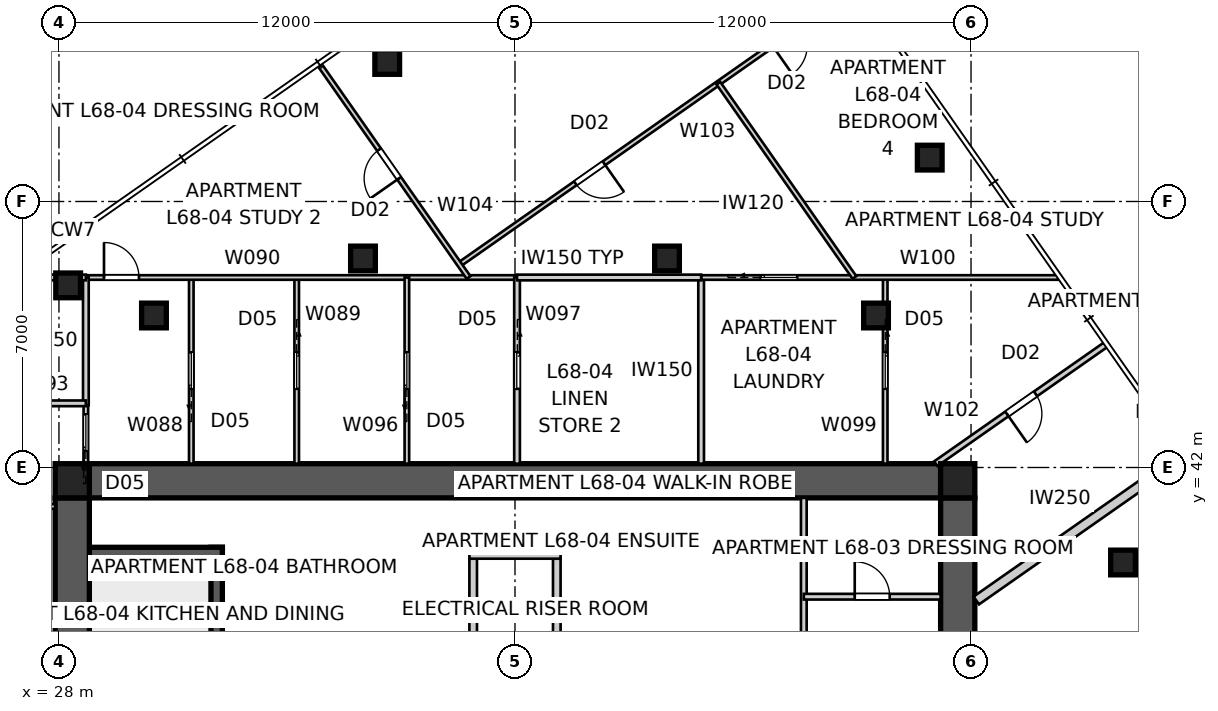
"""IFC4 building model, lengths in metres.
Left out: names, types, materials, properties, quantities, classifications, styles, units other than length and angle.
Written with IfcOpenShell. Run it as: python <this file> out.ifc"""

import sys

from ifc_helpers import new_model, si_unit, direction, frame, frame_2d, origin, origin_2d, place, context, subcontext, project, spatial, polyline, rectangle, outline, extrude, element, fill, save


model = new_model("IFC4")
c1 = context("Model", 3, precision=1e-05, world=origin(), true_north=direction((0.0, 1.0)))
c2 = subcontext(c1, "Body", "Model", "MODEL_VIEW")
j1 = project(units=[si_unit("LENGTHUNIT", "METRE"), si_unit("PLANEANGLEUNIT", "RADIAN")], contexts=[c1])
p1 = place(None, origin())
s1 = spatial("IfcSite", under=j1, at=p1, CompositionType="ELEMENT")
p2 = place(p1, origin())
s2 = spatial("IfcBuilding", under=s1, at=p2, CompositionType="ELEMENT")
p3 = place(p2, frame((0.0, 0.0, 247.2)))
s3 = spatial("IfcBuildingStorey", under=s2, at=p3, CompositionType="ELEMENT", Elevation=247.2)
p4 = place(p3, frame((28.8, 41.65, 0.0), z_axis=(0.0, 0.0, 1.0), x_axis=(1.0, 0.0, 0.0)))
e1 = element("IfcWall", 1, at=p4, inside=s3, PredefinedType="SHEAR", context=c2, shape_type="SweptSolid", body=[
    extrude(outline(polyline([(0.0, -0.45), (22.4, -0.45), (22.4, -0.025), (22.85, -0.025), (22.85, 0.025), (22.4, 0.025), (22.4, 0.45), (0.0, 0.45), (0.0, 0.025), (-0.45, 0.025), (-0.45, -0.025), (0.0, -0.025), (0.0, -0.45)])), origin(), (0.0, 0.0, 1.0), 3.4),
])
p5 = place(p3, frame((51.65, 18.8, 0.0), z_axis=(0.0, 0.0, 1.0), x_axis=(0.0, 1.0, 0.0)))
e2 = element("IfcWall", 2, at=p5, inside=s3, PredefinedType="SHEAR", context=c2, shape_type="SweptSolid", body=[
    extrude(outline(polyline([(0.0, -0.45), (22.4, -0.45), (22.4, -0.025), (22.85, -0.025), (22.85, 0.025), (22.4, 0.025), (22.4, 0.45), (0.0, 0.45), (0.0, 0.025), (-0.45, 0.025), (-0.45, -0.025), (0.0, -0.025), (0.0, -0.45)])), origin(), (0.0, 0.0, 1.0), 3.4),
])
p6 = place(p5, frame((11.14, 0.0, 0.0)))
e3 = element("IfcOpeningElement", 3, at=p6, cuts=e2, PredefinedType="OPENING", context=c2, shape_type="SweptSolid", body=[
    extrude(rectangle(XDim=1.02, YDim=2.4, at=frame_2d((0.51, 1.2))), frame((0.0, 0.46, 0.0), z_axis=(0.0, -1.0, 0.0), x_axis=(1.0, 0.0, 0.0)), (0.0, 0.0, 1.0), 0.92),
])
p7 = place(p3, frame((28.35, 41.2, 0.0), z_axis=(0.0, 0.0, 1.0), x_axis=(0.0, -1.0, 0.0)))
e4 = element("IfcWall", 4, at=p7, inside=s3, PredefinedType="SHEAR", context=c2, shape_type="SweptSolid", body=[
    extrude(outline(polyline([(0.0, -0.45), (22.4, -0.45), (22.4, -0.025), (22.85, -0.025), (22.85, 0.025), (22.4, 0.025), (22.4, 0.45), (0.0, 0.45), (0.0, 0.025), (-0.45, 0.025), (-0.45, -0.025), (0.0, -0.025), (0.0, -0.45)])), origin(), (0.0, 0.0, 1.0), 3.4),
])
p8 = place(p7, frame((11.14, 0.0, 0.0)))
e5 = element("IfcOpeningElement", 5, at=p8, cuts=e4, PredefinedType="OPENING", context=c2, shape_type="SweptSolid", body=[
    extrude(rectangle(XDim=1.02, YDim=2.4, at=frame_2d((0.51, 1.2))), frame((0.0, 0.46, 0.0), z_axis=(0.0, -1.0, 0.0), x_axis=(1.0, 0.0, 0.0)), (0.0, 0.0, 1.0), 0.92),
])
p9 = place(p3, frame((32.15, 32.2, 0.0), z_axis=(0.0, 0.0, 1.0), x_axis=(0.0, 1.0, 0.0)))
e6 = element("IfcWall", 6, at=p9, inside=s3, PredefinedType="SHEAR", context=c2, shape_type="SweptSolid", body=[
    extrude(rectangle(XDim=7.7, YDim=0.3, at=frame_2d((3.85, 0.0))), origin(), (0.0, 0.0, 1.0), 3.4),
])
p10 = place(p3, frame((28.8, 39.75, 0.0), z_axis=(0.0, 0.0, 1.0), x_axis=(1.0, 0.0, 0.0)))
e7 = element("IfcWall", 7, at=p10, inside=s3, PredefinedType="SHEAR", context=c2, shape_type="SweptSolid", body=[
    extrude(rectangle(XDim=3.5, YDim=0.3, at=frame_2d((1.75, 0.0))), origin(), (0.0, 0.0, 1.0), 3.4),
])
for number, where, z_axis, x_axis in (
    (8, (38.9, 37.6, 0.0), (0.0, 0.0, 1.0), (0.0, 1.0, 0.0)),
    (9, (41.1, 37.6, 0.0), (0.0, 0.0, 1.0), (0.0, 1.0, 0.0)),
):
    element("IfcWall", number, at=place(p3, frame(where, z_axis=z_axis, x_axis=x_axis)), inside=s3, PredefinedType="SOLIDWALL", context=c2, shape_type="SweptSolid", body=[
        extrude(rectangle(XDim=2.0, YDim=0.2, at=frame_2d((1.0, 0.0))), origin(), (0.0, 0.0, 1.0), 3.4),
    ])
p11 = place(p3, frame((38.8, 39.7, 0.0), z_axis=(0.0, 0.0, 1.0), x_axis=(1.0, 0.0, 0.0)))
e10 = element("IfcWall", 10, at=p11, inside=s3, PredefinedType="SOLIDWALL", context=c2, shape_type="SweptSolid", body=[
    extrude(rectangle(XDim=2.4, YDim=0.2, at=frame_2d((1.2, 0.0))), origin(), (0.0, 0.0, 1.0), 3.4),
])
for number, where, z_axis, x_axis in (
    (11, (51.65, 41.65, 0.0), (0.0, 0.0, 1.0), (1.0, 0.0, 0.0)),
    (12, (28.35, 41.65, 0.0), (0.0, 0.0, 1.0), (1.0, 0.0, 0.0)),
):
    element("IfcColumn", number, at=place(p3, frame(where, z_axis=z_axis, x_axis=x_axis)), inside=s3, PredefinedType="COLUMN", context=c2, shape_type="SweptSolid", body=[
        extrude(rectangle(XDim=0.9, YDim=0.9, at=origin_2d()), origin(), (0.0, 0.0, 1.0), 3.4),
    ])
for number, where, z_axis, x_axis in (
    (13, (50.914, 50.155, 0.0), (0.0, 0.0, 1.0), (1.0, 0.0, 0.0)),
    (14, (36.638, 52.672, 0.0), (0.0, 0.0, 1.0), (1.0, 0.0, 0.0)),
    (15, (28.242, 46.793, 0.0), (0.0, 0.0, 1.0), (1.0, 0.0, 0.0)),
    (16, (56.0, 39.5, 0.0), (0.0, 0.0, 1.0), (1.0, 0.0, 0.0)),
    (17, (49.5, 46.0, 0.0), (0.0, 0.0, 1.0), (1.0, 0.0, 0.0)),
    (18, (44.0, 47.5, 0.0), (0.0, 0.0, 1.0), (1.0, 0.0, 0.0)),
    (19, (36.0, 47.5, 0.0), (0.0, 0.0, 1.0), (1.0, 0.0, 0.0)),
    (20, (30.5, 46.0, 0.0), (0.0, 0.0, 1.0), (1.0, 0.0, 0.0)),
):
    element("IfcColumn", number, at=place(p3, frame(where, z_axis=z_axis, x_axis=x_axis)), inside=s3, PredefinedType="COLUMN", context=c2, shape_type="SweptSolid", body=[
        extrude(rectangle(XDim=0.65, YDim=0.65, at=origin_2d()), origin(), (0.0, 0.0, 1.0), 3.4),
    ])
p12 = place(p3, frame((57.612, 42.332, 0.0), z_axis=(0.0, 0.0, 1.0), x_axis=(-0.819161528122, -0.573562891796, 0.0)))
e21 = element("IfcWall", 21, at=p12, inside=s3, PredefinedType="PARTITIONING", context=c2, shape_type="SweptSolid", body=[
    extrude(rectangle(XDim=6.681, YDim=0.25, at=frame_2d((3.341, 0.0))), origin(), (0.0, 0.0, 1.0), 3.25),
])
p13 = place(p3, frame((47.6, 41.2, 0.0), z_axis=(0.0, 0.0, 1.0), x_axis=(0.0, -1.0, 0.0)))
e22 = element("IfcWall", 22, at=p13, inside=s3, PredefinedType="SOLIDWALL", context=c2, shape_type="SweptSolid", body=[
    extrude(rectangle(XDim=5.9, YDim=0.15, at=frame_2d((2.95, 0.0))), origin(), (0.0, 0.0, 1.0), 3.25),
])
p14 = place(p3, frame((47.6, 38.6, 0.0), z_axis=(0.0, 0.0, 1.0), x_axis=(1.0, 0.0, 0.0)))
e23 = element("IfcWall", 23, at=p14, inside=s3, PredefinedType="SOLIDWALL", context=c2, shape_type="SweptSolid", body=[
    extrude(rectangle(XDim=3.6, YDim=0.15, at=frame_2d((1.8, 0.0))), origin(), (0.0, 0.0, 1.0), 3.25),
])
p15 = place(p14, frame((1.34, 0.0, 0.0)))
e24 = element("IfcOpeningElement", 24, at=p15, cuts=e23, PredefinedType="OPENING", context=c2, shape_type="SweptSolid", body=[
    extrude(rectangle(XDim=0.92, YDim=2.1, at=frame_2d((0.46, 1.05))), frame((0.0, 0.085, 0.0), z_axis=(0.0, -1.0, 0.0), x_axis=(1.0, 0.0, 0.0)), (0.0, 0.0, 1.0), 0.17),
])
p16 = place(p3, frame((23.0, 40.974, 0.0), z_axis=(0.0, 0.0, 1.0), x_axis=(1.0, 0.0, 0.0)))
e25 = element("IfcWall", 25, at=p16, inside=s3, PredefinedType="PARTITIONING", context=c2, shape_type="SweptSolid", body=[
    extrude(rectangle(XDim=4.9, YDim=0.12, at=frame_2d((2.45, 0.0))), origin(), (0.0, 0.0, 1.0), 3.25),
])
p17 = place(p16, frame((1.97, 0.0, 0.0)))
e26 = element("IfcOpeningElement", 26, at=p17, cuts=e25, PredefinedType="OPENING", context=c2, shape_type="SweptSolid", body=[
    extrude(rectangle(XDim=0.96, YDim=2.1, at=frame_2d((0.48, 1.05))), frame((0.0, 0.07, 0.0), z_axis=(0.0, -1.0, 0.0), x_axis=(1.0, 0.0, 0.0)), (0.0, 0.0, 1.0), 0.14),
])
p18 = place(p3, frame((31.482, 42.1, 0.0), z_axis=(0.0, 0.0, 1.0), x_axis=(0.0, 1.0, 0.0)))
e27 = element("IfcWall", 27, at=p18, inside=s3, PredefinedType="PARTITIONING", context=c2, shape_type="SweptSolid", body=[
    extrude(rectangle(XDim=4.9, YDim=0.12, at=frame_2d((2.45, 0.0))), origin(), (0.0, 0.0, 1.0), 3.25),
])
p19 = place(p18, frame((1.97, 0.0, 0.0)))
e28 = element("IfcOpeningElement", 28, at=p19, cuts=e27, PredefinedType="OPENING", context=c2, shape_type="SweptSolid", body=[
    extrude(rectangle(XDim=0.96, YDim=2.1, at=frame_2d((0.48, 1.05))), frame((0.0, 0.07, 0.0), z_axis=(0.0, -1.0, 0.0), x_axis=(1.0, 0.0, 0.0)), (0.0, 0.0, 1.0), 0.14),
])
p20 = place(p3, frame((34.256, 47.0, 0.0), z_axis=(0.0, 0.0, 1.0), x_axis=(0.0, -1.0, 0.0)))
e29 = element("IfcWall", 29, at=p20, inside=s3, PredefinedType="PARTITIONING", context=c2, shape_type="SweptSolid", body=[
    extrude(rectangle(XDim=4.9, YDim=0.12, at=frame_2d((2.45, 0.0))), origin(), (0.0, 0.0, 1.0), 2.796),
])
p21 = place(p20, frame((1.97, 0.0, 0.0)))
e30 = element("IfcOpeningElement", 30, at=p21, cuts=e29, PredefinedType="OPENING", context=c2, shape_type="SweptSolid", body=[
    extrude(rectangle(XDim=0.96, YDim=2.1, at=frame_2d((0.48, 1.05))), frame((0.0, 0.07, 0.0), z_axis=(0.0, -1.0, 0.0), x_axis=(1.0, 0.0, 0.0)), (0.0, 0.0, 1.0), 0.14),
])
p22 = place(p3, frame((28.708, 47.0, 0.0), z_axis=(0.0, 0.0, 1.0), x_axis=(1.0, 0.0, 0.0)))
e31 = element("IfcWall", 31, at=p22, inside=s3, PredefinedType="PARTITIONING", context=c2, shape_type="SweptSolid", body=[
    extrude(rectangle(XDim=11.346, YDim=0.12, at=frame_2d((5.673, 0.0))), origin(), (0.0, 0.0, 1.0), 2.55),
])
p23 = place(p22, frame((0.477, 0.0, 0.0)))
e32 = element("IfcOpeningElement", 32, at=p23, cuts=e31, PredefinedType="OPENING", context=c2, shape_type="SweptSolid", body=[
    extrude(rectangle(XDim=0.92, YDim=2.34, at=frame_2d((0.46, 1.17))), frame((0.0, 0.07, 0.0), z_axis=(0.0, -1.0, 0.0), x_axis=(1.0, 0.0, 0.0)), (0.0, 0.0, 1.0), 0.14),
])
p24 = place(p3, frame((28.708, 41.18, 0.0), z_axis=(0.0, 0.0, 1.0), x_axis=(0.0, 1.0, 0.0)))
e33 = element("IfcWall", 33, at=p24, inside=s3, PredefinedType="PARTITIONING", context=c2, shape_type="SweptSolid", body=[
    extrude(rectangle(XDim=2.458, YDim=0.12, at=frame_2d((1.229, 0.0))), origin(), (0.0, 0.0, 1.0), 3.25),
])
p25 = place(p24, frame((1.259, 0.0, 0.0)))
e34 = element("IfcOpeningElement", 34, at=p25, cuts=e33, PredefinedType="OPENING", context=c2, shape_type="SweptSolid", body=[
    extrude(rectangle(XDim=0.96, YDim=2.1, at=frame_2d((0.48, 1.05))), frame((0.0, 0.07, 0.0), z_axis=(0.0, -1.0, 0.0), x_axis=(1.0, 0.0, 0.0)), (0.0, 0.0, 1.0), 0.14),
])
p26 = place(p3, frame((28.708, 43.638, 0.0), z_axis=(0.0, 0.0, 1.0), x_axis=(0.0, 1.0, 0.0)))
e35 = element("IfcWall", 35, at=p26, inside=s3, PredefinedType="SOLIDWALL", context=c2, shape_type="SweptSolid", body=[
    extrude(rectangle(XDim=3.362, YDim=0.15, at=frame_2d((1.681, 0.0))), origin(), (0.0, 0.0, 1.0), 3.25),
])
p27 = place(p3, frame((23.0, 43.688, 0.0), z_axis=(0.0, 0.0, 1.0), x_axis=(1.0, 0.0, 0.0)))
e36 = element("IfcWall", 36, at=p27, inside=s3, PredefinedType="SOLIDWALL", context=c2, shape_type="SweptSolid", body=[
    extrude(rectangle(XDim=5.708, YDim=0.15, at=frame_2d((2.854, 0.0))), origin(), (0.0, 0.0, 1.0), 3.25),
])
p28 = place(p27, frame((2.374, 0.0, 0.0)))
e37 = element("IfcOpeningElement", 37, at=p28, cuts=e36, PredefinedType="OPENING", context=c2, shape_type="SweptSolid", body=[
    extrude(rectangle(XDim=0.96, YDim=2.1, at=frame_2d((0.48, 1.05))), frame((0.0, 0.085, 0.0), z_axis=(0.0, -1.0, 0.0), x_axis=(1.0, 0.0, 0.0)), (0.0, 0.0, 1.0), 0.17),
])
p29 = place(p3, frame((26.864, 47.0, 0.0), z_axis=(0.0, 0.0, 1.0), x_axis=(1.0, 0.0, 0.0)))
e38 = element("IfcWall", 38, at=p29, inside=s3, PredefinedType="SOLIDWALL", context=c2, shape_type="SweptSolid", body=[
    extrude(rectangle(XDim=1.844, YDim=0.15, at=frame_2d((0.922, 0.0))), origin(), (0.0, 0.0, 1.0), 3.25),
])
p30 = place(p3, frame((37.155, 42.1, 0.0), z_axis=(0.0, 0.0, 1.0), x_axis=(0.0, 1.0, 0.0)))
e39 = element("IfcWall", 39, at=p30, inside=s3, PredefinedType="PARTITIONING", context=c2, shape_type="SweptSolid", body=[
    extrude(rectangle(XDim=4.9, YDim=0.12, at=frame_2d((2.45, 0.0))), origin(), (0.0, 0.0, 1.0), 2.796),
])
p31 = place(p30, frame((1.97, 0.0, 0.0)))
e40 = element("IfcOpeningElement", 40, at=p31, cuts=e39, PredefinedType="OPENING", context=c2, shape_type="SweptSolid", body=[
    extrude(rectangle(XDim=0.96, YDim=2.1, at=frame_2d((0.48, 1.05))), frame((0.0, 0.07, 0.0), z_axis=(0.0, -1.0, 0.0), x_axis=(1.0, 0.0, 0.0)), (0.0, 0.0, 1.0), 0.14),
])
p32 = place(p3, frame((40.054, 47.0, 0.0), z_axis=(0.0, 0.0, 1.0), x_axis=(0.0, -1.0, 0.0)))
e41 = element("IfcWall", 41, at=p32, inside=s3, PredefinedType="SOLIDWALL", context=c2, shape_type="SweptSolid", body=[
    extrude(rectangle(XDim=4.9, YDim=0.15, at=frame_2d((2.45, 0.0))), origin(), (0.0, 0.0, 1.0), 2.796),
])
p33 = place(p32, frame((1.97, 0.0, 0.0)))
e42 = element("IfcOpeningElement", 42, at=p33, cuts=e41, PredefinedType="OPENING", context=c2, shape_type="SweptSolid", body=[
    extrude(rectangle(XDim=0.96, YDim=2.1, at=frame_2d((0.48, 1.05))), frame((0.0, 0.085, 0.0), z_axis=(0.0, -1.0, 0.0), x_axis=(1.0, 0.0, 0.0)), (0.0, 0.0, 1.0), 0.17),
])
p34 = place(p3, frame((44.898, 42.1, 0.0), z_axis=(0.0, 0.0, 1.0), x_axis=(0.0, 1.0, 0.0)))
e43 = element("IfcWall", 43, at=p34, inside=s3, PredefinedType="SOLIDWALL", context=c2, shape_type="SweptSolid", body=[
    extrude(rectangle(XDim=4.9, YDim=0.15, at=frame_2d((2.45, 0.0))), origin(), (0.0, 0.0, 1.0), 3.25),
])
p35 = place(p3, frame((49.742, 47.0, 0.0), z_axis=(0.0, 0.0, 1.0), x_axis=(0.0, -1.0, 0.0)))
e44 = element("IfcWall", 44, at=p35, inside=s3, PredefinedType="PARTITIONING", context=c2, shape_type="SweptSolid", body=[
    extrude(rectangle(XDim=4.9, YDim=0.12, at=frame_2d((2.45, 0.0))), origin(), (0.0, 0.0, 1.0), 3.25),
])
p36 = place(p35, frame((1.97, 0.0, 0.0)))
e45 = element("IfcOpeningElement", 45, at=p36, cuts=e44, PredefinedType="OPENING", context=c2, shape_type="SweptSolid", body=[
    extrude(rectangle(XDim=0.96, YDim=2.1, at=frame_2d((0.48, 1.05))), frame((0.0, 0.07, 0.0), z_axis=(0.0, -1.0, 0.0), x_axis=(1.0, 0.0, 0.0)), (0.0, 0.0, 1.0), 0.14),
])
p37 = place(p3, frame((44.898, 47.0, 0.0), z_axis=(0.0, 0.0, 1.0), x_axis=(1.0, 0.0, 0.0)))
e46 = element("IfcWall", 46, at=p37, inside=s3, PredefinedType="PARTITIONING", context=c2, shape_type="SweptSolid", body=[
    extrude(rectangle(XDim=9.396, YDim=0.12, at=frame_2d((4.698, 0.0))), origin(), (0.0, 0.0, 1.0), 2.55),
])
p38 = place(p37, frame((1.568, 0.0, 0.0)))
e47 = element("IfcOpeningElement", 47, at=p38, cuts=e46, PredefinedType="OPENING", context=c2, shape_type="SweptSolid", body=[
    extrude(rectangle(XDim=0.96, YDim=2.1, at=frame_2d((0.48, 1.05))), frame((0.0, 0.07, 0.0), z_axis=(0.0, -1.0, 0.0), x_axis=(1.0, 0.0, 0.0)), (0.0, 0.0, 1.0), 0.14),
])
p39 = place(p3, frame((40.054, 47.0, 0.0), z_axis=(0.0, 0.0, 1.0), x_axis=(1.0, 0.0, 0.0)))
e48 = element("IfcWall", 48, at=p39, inside=s3, PredefinedType="SOLIDWALL", context=c2, shape_type="SweptSolid", body=[
    extrude(rectangle(XDim=4.844, YDim=0.15, at=frame_2d((2.422, 0.0))), origin(), (0.0, 0.0, 1.0), 3.25),
])
p40 = place(p3, frame((55.537, 45.226, 0.0), z_axis=(0.0, 0.0, 1.0), x_axis=(-0.819158250207, -0.573567573279, 0.0)))
e49 = element("IfcWall", 49, at=p40, inside=s3, PredefinedType="SOLIDWALL", context=c2, shape_type="SweptSolid", body=[
    extrude(rectangle(XDim=5.45, YDim=0.15, at=frame_2d((2.725, 0.0))), origin(), (0.0, 0.0, 1.0), 3.25),
])
p41 = place(p40, frame((2.245, 0.0, 0.0)))
e50 = element("IfcOpeningElement", 50, at=p41, cuts=e49, PredefinedType="OPENING", context=c2, shape_type="SweptSolid", body=[
    extrude(rectangle(XDim=0.92, YDim=2.34, at=frame_2d((0.46, 1.17))), frame((0.0, 0.085, 0.0), z_axis=(0.0, -1.0, 0.0), x_axis=(1.0, 0.0, 0.0)), (0.0, 0.0, 1.0), 0.17),
])
p42 = place(p3, frame((48.949, 54.633, 0.0), z_axis=(0.0, 0.0, 1.0), x_axis=(-0.819155207289, -0.573571919092, 0.0)))
e51 = element("IfcWall", 51, at=p42, inside=s3, PredefinedType="PARTITIONING", context=c2, shape_type="SweptSolid", body=[
    extrude(rectangle(XDim=12.71, YDim=0.12, at=frame_2d((6.355, 0.0))), origin(), (0.0, 0.0, 1.0), 3.25),
])
p43 = place(p42, frame((8.066, 0.0, 0.0)))
e52 = element("IfcOpeningElement", 52, at=p43, cuts=e51, PredefinedType="OPENING", context=c2, shape_type="SweptSolid", body=[
    extrude(rectangle(XDim=0.92, YDim=2.34, at=frame_2d((0.46, 1.17))), frame((0.0, 0.07, 0.0), z_axis=(0.0, -1.0, 0.0), x_axis=(1.0, 0.0, 0.0)), (0.0, 0.0, 1.0), 0.14),
])
p44 = place(p42, frame((1.741, 0.0, 0.0)))
e53 = element("IfcOpeningElement", 53, at=p44, cuts=e51, PredefinedType="OPENING", context=c2, shape_type="SweptSolid", body=[
    extrude(rectangle(XDim=0.92, YDim=2.34, at=frame_2d((0.46, 1.17))), frame((0.0, 0.07, 0.0), z_axis=(0.0, -1.0, 0.0), x_axis=(1.0, 0.0, 0.0)), (0.0, 0.0, 1.0), 0.14),
])
p45 = place(p3, frame((38.778, 47.0, 0.0), z_axis=(0.0, 0.0, 1.0), x_axis=(-0.57357503053, 0.819153028653, 0.0)))
e54 = element("IfcWall", 54, at=p45, inside=s3, PredefinedType="PARTITIONING", context=c2, shape_type="SweptSolid", body=[
    extrude(rectangle(XDim=6.834, YDim=0.12, at=frame_2d((3.417, 0.0))), origin(), (0.0, 0.0, 1.0), 3.25),
])
p46 = place(p45, frame((3.186, 0.0, 0.0)))
e55 = element("IfcOpeningElement", 55, at=p46, cuts=e54, PredefinedType="OPENING", context=c2, shape_type="SweptSolid", body=[
    extrude(rectangle(XDim=0.92, YDim=2.34, at=frame_2d((0.46, 1.17))), frame((0.0, 0.07, 0.0), z_axis=(0.0, -1.0, 0.0), x_axis=(1.0, 0.0, 0.0)), (0.0, 0.0, 1.0), 0.14),
])
p47 = place(p3, frame((48.932, 47.0, 0.0), z_axis=(0.0, 0.0, 1.0), x_axis=(-0.573569946952, 0.819156588177, 0.0)))
e56 = element("IfcWall", 56, at=p47, inside=s3, PredefinedType="PARTITIONING", context=c2, shape_type="SweptSolid", body=[
    extrude(rectangle(XDim=6.243, YDim=0.12, at=frame_2d((3.122, 0.0))), origin(), (0.0, 0.0, 1.0), 3.25),
])
p48 = place(p15, origin())
e57 = element("IfcDoor", 57, at=p48, inside=s3, OperationType="SINGLE_SWING_LEFT", PredefinedType="DOOR", context=c2, shape_type="SweptSolid", body=[
    extrude(rectangle(XDim=0.92, YDim=2.1, at=frame_2d((0.46, 1.05))), frame((0.0, 0.025, 0.0), z_axis=(0.0, -1.0, 0.0), x_axis=(1.0, 0.0, 0.0)), (0.0, 0.0, 1.0), 0.05),
])
fill(e24, e57)
p49 = place(p25, origin())
e58 = element("IfcDoor", 58, at=p49, inside=s3, OperationType="SLIDING_TO_LEFT", PredefinedType="DOOR", context=c2, shape_type="SweptSolid", body=[
    extrude(rectangle(XDim=0.96, YDim=2.1, at=frame_2d((0.48, 1.05))), frame((0.0, 0.025, 0.0), z_axis=(0.0, -1.0, 0.0), x_axis=(1.0, 0.0, 0.0)), (0.0, 0.0, 1.0), 0.05),
])
fill(e34, e58)
p50 = place(p19, origin())
e59 = element("IfcDoor", 59, at=p50, inside=s3, OperationType="SLIDING_TO_LEFT", PredefinedType="DOOR", context=c2, shape_type="SweptSolid", body=[
    extrude(rectangle(XDim=0.96, YDim=2.1, at=frame_2d((0.48, 1.05))), frame((0.0, 0.025, 0.0), z_axis=(0.0, -1.0, 0.0), x_axis=(1.0, 0.0, 0.0)), (0.0, 0.0, 1.0), 0.05),
])
fill(e28, e59)
p51 = place(p23, origin())
e60 = element("IfcDoor", 60, at=p51, inside=s3, OperationType="SINGLE_SWING_LEFT", PredefinedType="DOOR", context=c2, shape_type="SweptSolid", body=[
    extrude(rectangle(XDim=0.92, YDim=2.34, at=frame_2d((0.46, 1.17))), frame((0.0, 0.025, 0.0), z_axis=(0.0, -1.0, 0.0), x_axis=(1.0, 0.0, 0.0)), (0.0, 0.0, 1.0), 0.05),
])
fill(e32, e60)
p52 = place(p21, origin())
e61 = element("IfcDoor", 61, at=p52, inside=s3, OperationType="SLIDING_TO_LEFT", PredefinedType="DOOR", context=c2, shape_type="SweptSolid", body=[
    extrude(rectangle(XDim=0.96, YDim=2.1, at=frame_2d((0.48, 1.05))), frame((0.0, 0.025, 0.0), z_axis=(0.0, -1.0, 0.0), x_axis=(1.0, 0.0, 0.0)), (0.0, 0.0, 1.0), 0.05),
])
fill(e30, e61)
p53 = place(p46, origin())
e62 = element("IfcDoor", 62, at=p53, inside=s3, OperationType="SINGLE_SWING_LEFT", PredefinedType="DOOR", context=c2, shape_type="SweptSolid", body=[
    extrude(rectangle(XDim=0.92, YDim=2.34, at=frame_2d((0.46, 1.17))), frame((0.0, 0.025, 0.0), z_axis=(0.0, -1.0, 0.0), x_axis=(1.0, 0.0, 0.0)), (0.0, 0.0, 1.0), 0.05),
])
fill(e55, e62)
p54 = place(p31, origin())
e63 = element("IfcDoor", 63, at=p54, inside=s3, OperationType="SLIDING_TO_LEFT", PredefinedType="DOOR", context=c2, shape_type="SweptSolid", body=[
    extrude(rectangle(XDim=0.96, YDim=2.1, at=frame_2d((0.48, 1.05))), frame((0.0, 0.025, 0.0), z_axis=(0.0, -1.0, 0.0), x_axis=(1.0, 0.0, 0.0)), (0.0, 0.0, 1.0), 0.05),
])
fill(e40, e63)
p55 = place(p43, origin())
e64 = element("IfcDoor", 64, at=p55, inside=s3, OperationType="SINGLE_SWING_LEFT", PredefinedType="DOOR", context=c2, shape_type="SweptSolid", body=[
    extrude(rectangle(XDim=0.92, YDim=2.34, at=frame_2d((0.46, 1.17))), frame((0.0, 0.025, 0.0), z_axis=(0.0, -1.0, 0.0), x_axis=(1.0, 0.0, 0.0)), (0.0, 0.0, 1.0), 0.05),
])
fill(e52, e64)
p56 = place(p33, origin())
e65 = element("IfcDoor", 65, at=p56, inside=s3, OperationType="SLIDING_TO_LEFT", PredefinedType="DOOR", context=c2, shape_type="SweptSolid", body=[
    extrude(rectangle(XDim=0.96, YDim=2.1, at=frame_2d((0.48, 1.05))), frame((0.0, 0.025, 0.0), z_axis=(0.0, -1.0, 0.0), x_axis=(1.0, 0.0, 0.0)), (0.0, 0.0, 1.0), 0.05),
])
fill(e42, e65)
p57 = place(p38, origin())
e66 = element("IfcDoor", 66, at=p57, inside=s3, OperationType="SLIDING_TO_LEFT", PredefinedType="DOOR", context=c2, shape_type="SweptSolid", body=[
    extrude(rectangle(XDim=0.96, YDim=2.1, at=frame_2d((0.48, 1.05))), frame((0.0, 0.025, 0.0), z_axis=(0.0, -1.0, 0.0), x_axis=(1.0, 0.0, 0.0)), (0.0, 0.0, 1.0), 0.05),
])
fill(e47, e66)
p58 = place(p36, origin())
e67 = element("IfcDoor", 67, at=p58, inside=s3, OperationType="SLIDING_TO_LEFT", PredefinedType="DOOR", context=c2, shape_type="SweptSolid", body=[
    extrude(rectangle(XDim=0.96, YDim=2.1, at=frame_2d((0.48, 1.05))), frame((0.0, 0.025, 0.0), z_axis=(0.0, -1.0, 0.0), x_axis=(1.0, 0.0, 0.0)), (0.0, 0.0, 1.0), 0.05),
])
fill(e45, e67)
p59 = place(p41, origin())
e68 = element("IfcDoor", 68, at=p59, inside=s3, OperationType="SINGLE_SWING_RIGHT", PredefinedType="DOOR", context=c2, shape_type="SweptSolid", body=[
    extrude(rectangle(XDim=0.92, YDim=2.34, at=frame_2d((0.46, 1.17))), frame((0.0, 0.025, 0.0), z_axis=(0.0, -1.0, 0.0), x_axis=(1.0, 0.0, 0.0)), (0.0, 0.0, 1.0), 0.05),
])
fill(e50, e68)
save(model, sys.argv[1])
